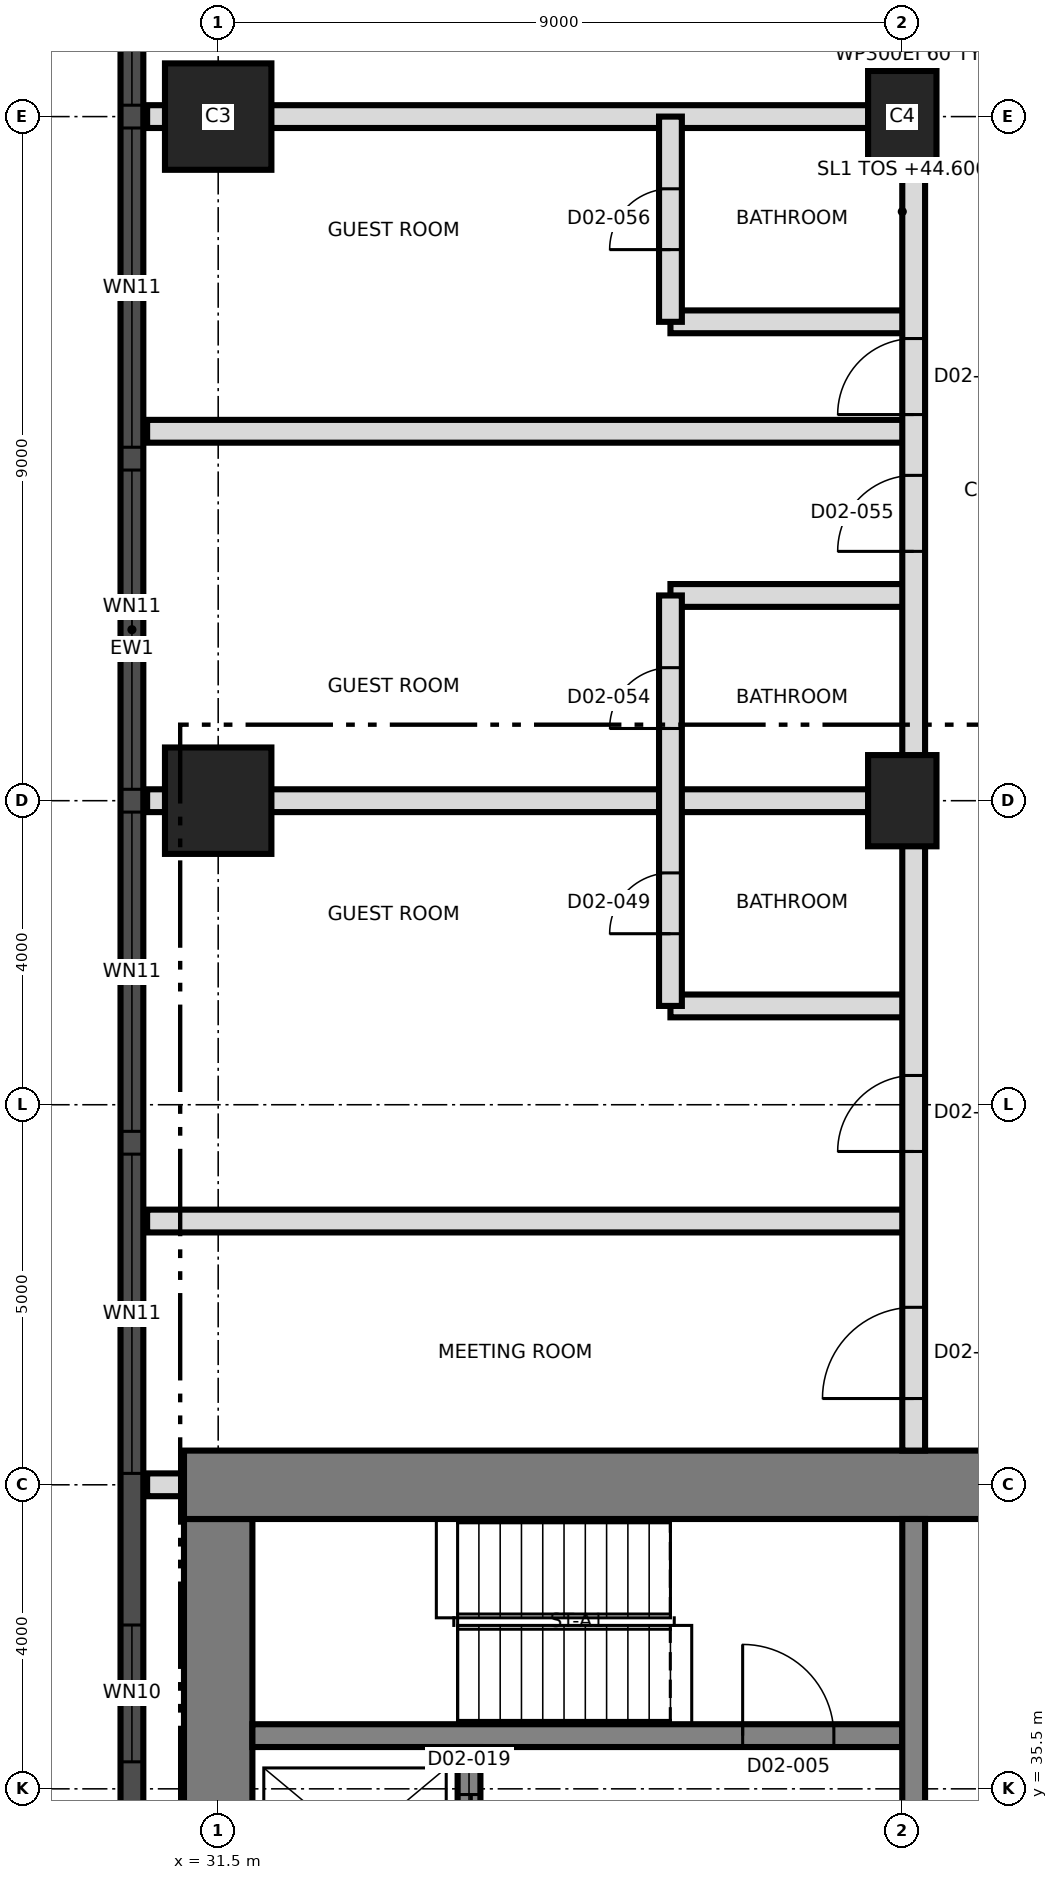
"""IFC4 building model, lengths in metres.
Left out: names, types, materials, properties, quantities, classifications, styles, units other than length and angle.
Written with IfcOpenShell. Run it as: python <this file> out.ifc"""

import sys

from ifc_helpers import new_model, si_unit, direction, frame, frame_2d, origin, origin_2d, place, context, subcontext, project, spatial, rectangle, extrude, element, fill, save


model = new_model("IFC4")
c1 = context("Model", 3, precision=1e-05, world=origin(), true_north=direction((0.0, 1.0)))
c2 = subcontext(c1, "Body", "Model", "MODEL_VIEW")
j1 = project(units=[si_unit("LENGTHUNIT", "METRE"), si_unit("PLANEANGLEUNIT", "RADIAN")], contexts=[c1])
p1 = place(None, origin())
s1 = spatial("IfcSite", under=j1, at=p1, CompositionType="ELEMENT")
p2 = place(p1, origin())
s2 = spatial("IfcBuilding", under=s1, at=p2, CompositionType="ELEMENT")
p3 = place(p2, frame((0.0, 0.0, 44.6)))
s3 = spatial("IfcBuildingStorey", under=s2, at=p3, CompositionType="ELEMENT", Elevation=44.6)
p4 = place(p3, frame((31.5, 21.95, 0.0), z_axis=(0.0, 0.0, 1.0), x_axis=(0.0, 1.0, 0.0)))
e1 = element("IfcWall", 1, at=p4, inside=s3, PredefinedType="SHEAR", context=c2, shape_type="SweptSolid", body=[
    extrude(rectangle(XDim=17.1, YDim=0.9, at=frame_2d((8.55, 0.0))), origin(), (0.0, 0.0, 1.0), 3.7),
])
p5 = place(p3, frame((31.05, 39.5, 0.0), z_axis=(0.0, 0.0, 1.0), x_axis=(1.0, 0.0, 0.0)))
e2 = element("IfcWall", 2, at=p5, inside=s3, PredefinedType="SHEAR", context=c2, shape_type="SweptSolid", body=[
    extrude(rectangle(XDim=27.0, YDim=0.9, at=frame_2d((13.5, 0.0))), origin(), (0.0, 0.0, 1.0), 3.7),
])
p6 = place(p5, frame((10.65, 0.0, 0.0)))
e3 = element("IfcOpeningElement", 3, at=p6, cuts=e2, PredefinedType="OPENING", context=c2, shape_type="SweptSolid", body=[
    extrude(rectangle(XDim=1.2, YDim=2.1, at=frame_2d((0.6, 1.05))), frame((0.0, 0.46, 0.0), z_axis=(0.0, -1.0, 0.0), x_axis=(1.0, 0.0, 0.0)), (0.0, 0.0, 1.0), 0.92),
])
p7 = place(p3, frame((31.95, 36.2, 0.0), z_axis=(0.0, 0.0, 1.0), x_axis=(1.0, 0.0, 0.0)))
e4 = element("IfcWall", 4, at=p7, inside=s3, PredefinedType="SHEAR", context=c2, shape_type="SweptSolid", body=[
    extrude(rectangle(XDim=8.55, YDim=0.3, at=frame_2d((4.275, 0.0))), origin(), (0.0, 0.0, 1.0), 3.7),
])
p8 = place(p7, frame((6.45, 0.0, 0.0)))
e5 = element("IfcOpeningElement", 5, at=p8, cuts=e4, PredefinedType="OPENING", context=c2, shape_type="SweptSolid", body=[
    extrude(rectangle(XDim=1.2, YDim=2.1, at=frame_2d((0.6, 1.05))), frame((0.0, 0.16, 0.0), z_axis=(0.0, -1.0, 0.0), x_axis=(1.0, 0.0, 0.0)), (0.0, 0.0, 1.0), 0.32),
])
p9 = place(p3, frame((40.65, 33.5, 0.0), z_axis=(0.0, 0.0, 1.0), x_axis=(0.0, 1.0, 0.0)))
e6 = element("IfcWall", 6, at=p9, inside=s3, PredefinedType="SHEAR", context=c2, shape_type="SweptSolid", body=[
    extrude(rectangle(XDim=5.55, YDim=0.3, at=frame_2d((2.775, 0.0))), origin(), (0.0, 0.0, 1.0), 3.7),
])
p10 = place(p3, frame((34.8, 33.5, 0.0), z_axis=(0.0, 0.0, 1.0), x_axis=(0.0, 1.0, 0.0)))
e7 = element("IfcWall", 7, at=p10, inside=s3, PredefinedType="SHEAR", context=c2, shape_type="SweptSolid", body=[
    extrude(rectangle(XDim=2.55, YDim=0.3, at=frame_2d((1.275, 0.0))), origin(), (0.0, 0.0, 1.0), 3.7),
])
p11 = place(p10, frame((0.625, 0.0, 0.0)))
e8 = element("IfcOpeningElement", 8, at=p11, cuts=e7, PredefinedType="OPENING", context=c2, shape_type="SweptSolid", body=[
    extrude(rectangle(XDim=1.3, YDim=2.4, at=frame_2d((0.65, 1.2))), frame((0.0, 0.16, 0.0), z_axis=(0.0, -1.0, 0.0), x_axis=(1.0, 0.0, 0.0)), (0.0, 0.0, 1.0), 0.32),
])
p12 = place(p3, frame((31.5, 48.5, 0.0), z_axis=(0.0, 0.0, 1.0), x_axis=(1.0, 0.0, 0.0)))
e9 = element("IfcColumn", 9, at=p12, inside=s3, PredefinedType="COLUMN", context=c2, shape_type="SweptSolid", body=[
    extrude(rectangle(XDim=1.4, YDim=1.4, at=origin_2d()), origin(), (0.0, 0.0, 1.0), 3.7),
])
p13 = place(p3, frame((40.5, 48.5, 0.0), z_axis=(0.0, 0.0, 1.0), x_axis=(0.0, 1.0, 0.0)))
e10 = element("IfcColumn", 10, at=p13, inside=s3, PredefinedType="COLUMN", context=c2, shape_type="SweptSolid", body=[
    extrude(rectangle(XDim=1.2, YDim=0.9, at=origin_2d()), origin(), (0.0, 0.0, 1.0), 3.7),
])
p14 = place(p3, frame((31.5, 57.5, 0.0), z_axis=(0.0, 0.0, 1.0), x_axis=(1.0, 0.0, 0.0)))
e11 = element("IfcColumn", 11, at=p14, inside=s3, PredefinedType="COLUMN", context=c2, shape_type="SweptSolid", body=[
    extrude(rectangle(XDim=1.4, YDim=1.4, at=origin_2d()), origin(), (0.0, 0.0, 1.0), 3.7),
])
p15 = place(p3, frame((40.5, 57.5, 0.0), z_axis=(0.0, 0.0, 1.0), x_axis=(0.0, 1.0, 0.0)))
e12 = element("IfcColumn", 12, at=p15, inside=s3, PredefinedType="COLUMN", context=c2, shape_type="SweptSolid", body=[
    extrude(rectangle(XDim=1.2, YDim=0.9, at=origin_2d()), origin(), (0.0, 0.0, 1.0), 3.7),
])
p16 = place(p3, frame((30.365, 66.992, 0.0), z_axis=(0.0, 0.0, 1.0), x_axis=(0.0, -1.0, 0.0)))
e13 = element("IfcWall", 13, at=p16, inside=s3, PredefinedType="SOLIDWALL", context=c2, shape_type="SweptSolid", body=[
    extrude(rectangle(XDim=32.981, YDim=0.3, at=frame_2d((16.491, 0.0))), origin(), (0.0, 0.0, 1.0), 3.4),
])
p17 = place(p16, frame((1.596, 0.0, 0.3)))
e14 = element("IfcOpeningElement", 14, at=p17, cuts=e13, PredefinedType="OPENING", context=c2, shape_type="SweptSolid", body=[
    extrude(rectangle(XDim=1.8, YDim=2.4, at=frame_2d((0.9, 1.2))), frame((0.0, 0.16, 0.0), z_axis=(0.0, -1.0, 0.0), x_axis=(1.0, 0.0, 0.0)), (0.0, 0.0, 1.0), 0.32),
])
p18 = place(p16, frame((5.142, 0.0, 0.9)))
e15 = element("IfcOpeningElement", 15, at=p18, cuts=e13, PredefinedType="OPENING", context=c2, shape_type="SweptSolid", body=[
    extrude(rectangle(XDim=4.2, YDim=1.5, at=frame_2d((2.1, 0.75))), frame((0.0, 0.16, 0.0), z_axis=(0.0, -1.0, 0.0), x_axis=(1.0, 0.0, 0.0)), (0.0, 0.0, 1.0), 0.32),
])
p19 = place(p16, frame((9.642, 0.0, 0.9)))
e16 = element("IfcOpeningElement", 16, at=p19, cuts=e13, PredefinedType="OPENING", context=c2, shape_type="SweptSolid", body=[
    extrude(rectangle(XDim=4.2, YDim=1.5, at=frame_2d((2.1, 0.75))), frame((0.0, 0.16, 0.0), z_axis=(0.0, -1.0, 0.0), x_axis=(1.0, 0.0, 0.0)), (0.0, 0.0, 1.0), 0.32),
])
p20 = place(p16, frame((14.142, 0.0, 0.9)))
e17 = element("IfcOpeningElement", 17, at=p20, cuts=e13, PredefinedType="OPENING", context=c2, shape_type="SweptSolid", body=[
    extrude(rectangle(XDim=4.2, YDim=1.5, at=frame_2d((2.1, 0.75))), frame((0.0, 0.16, 0.0), z_axis=(0.0, -1.0, 0.0), x_axis=(1.0, 0.0, 0.0)), (0.0, 0.0, 1.0), 0.32),
])
p21 = place(p16, frame((18.642, 0.0, 0.9)))
e18 = element("IfcOpeningElement", 18, at=p21, cuts=e13, PredefinedType="OPENING", context=c2, shape_type="SweptSolid", body=[
    extrude(rectangle(XDim=4.2, YDim=1.5, at=frame_2d((2.1, 0.75))), frame((0.0, 0.16, 0.0), z_axis=(0.0, -1.0, 0.0), x_axis=(1.0, 0.0, 0.0)), (0.0, 0.0, 1.0), 0.32),
])
p22 = place(p16, frame((23.142, 0.0, 0.9)))
e19 = element("IfcOpeningElement", 19, at=p22, cuts=e13, PredefinedType="OPENING", context=c2, shape_type="SweptSolid", body=[
    extrude(rectangle(XDim=4.2, YDim=1.5, at=frame_2d((2.1, 0.75))), frame((0.0, 0.16, 0.0), z_axis=(0.0, -1.0, 0.0), x_axis=(1.0, 0.0, 0.0)), (0.0, 0.0, 1.0), 0.32),
])
p23 = place(p16, frame((29.337, 0.0, 0.3)))
e20 = element("IfcOpeningElement", 20, at=p23, cuts=e13, PredefinedType="OPENING", context=c2, shape_type="SweptSolid", body=[
    extrude(rectangle(XDim=1.8, YDim=2.4, at=frame_2d((0.9, 1.2))), frame((0.0, 0.16, 0.0), z_axis=(0.0, -1.0, 0.0), x_axis=(1.0, 0.0, 0.0)), (0.0, 0.0, 1.0), 0.32),
])
p24 = place(p3, frame((30.565, 39.5, 0.0), z_axis=(0.0, 0.0, 1.0), x_axis=(1.0, 0.0, 0.0)))
e21 = element("IfcWall", 21, at=p24, inside=s3, PredefinedType="PARTITIONING", context=c2, shape_type="SweptSolid", body=[
    extrude(rectangle(XDim=0.465, YDim=0.3, at=frame_2d((0.232, 0.0))), origin(), (0.0, 0.0, 1.0), 3.4),
])
p25 = place(p3, frame((30.565, 42.97, 0.0), z_axis=(0.0, 0.0, 1.0), x_axis=(1.0, 0.0, 0.0)))
e22 = element("IfcWall", 22, at=p25, inside=s3, PredefinedType="PARTITIONING", context=c2, shape_type="SweptSolid", body=[
    extrude(rectangle(XDim=10.085, YDim=0.3, at=frame_2d((5.042, 0.0))), origin(), (0.0, 0.0, 1.0), 3.4),
])
p26 = place(p3, frame((37.45, 45.8, 0.0), z_axis=(0.0, 0.0, 1.0), x_axis=(1.0, 0.0, 0.0)))
e23 = element("IfcWall", 23, at=p26, inside=s3, PredefinedType="PARTITIONING", context=c2, shape_type="SweptSolid", body=[
    extrude(rectangle(XDim=3.2, YDim=0.3, at=frame_2d((1.6, 0.0))), origin(), (0.0, 0.0, 1.0), 3.4),
])
p27 = place(p3, frame((30.565, 48.5, 0.0), z_axis=(0.0, 0.0, 1.0), x_axis=(1.0, 0.0, 0.0)))
e24 = element("IfcWall", 24, at=p27, inside=s3, PredefinedType="PARTITIONING", context=c2, shape_type="SweptSolid", body=[
    extrude(rectangle(XDim=10.085, YDim=0.3, at=frame_2d((5.042, 0.0))), origin(), (0.0, 0.0, 1.0), 3.4),
])
p28 = place(p3, frame((37.45, 51.2, 0.0), z_axis=(0.0, 0.0, 1.0), x_axis=(1.0, 0.0, 0.0)))
e25 = element("IfcWall", 25, at=p28, inside=s3, PredefinedType="PARTITIONING", context=c2, shape_type="SweptSolid", body=[
    extrude(rectangle(XDim=3.2, YDim=0.3, at=frame_2d((1.6, 0.0))), origin(), (0.0, 0.0, 1.0), 3.4),
])
p29 = place(p3, frame((30.565, 53.36, 0.0), z_axis=(0.0, 0.0, 1.0), x_axis=(1.0, 0.0, 0.0)))
e26 = element("IfcWall", 26, at=p29, inside=s3, PredefinedType="PARTITIONING", context=c2, shape_type="SweptSolid", body=[
    extrude(rectangle(XDim=10.085, YDim=0.3, at=frame_2d((5.042, 0.0))), origin(), (0.0, 0.0, 1.0), 3.4),
])
p30 = place(p3, frame((37.45, 54.8, 0.0), z_axis=(0.0, 0.0, 1.0), x_axis=(1.0, 0.0, 0.0)))
e27 = element("IfcWall", 27, at=p30, inside=s3, PredefinedType="PARTITIONING", context=c2, shape_type="SweptSolid", body=[
    extrude(rectangle(XDim=3.2, YDim=0.3, at=frame_2d((1.6, 0.0))), origin(), (0.0, 0.0, 1.0), 3.4),
])
p31 = place(p3, frame((30.565, 57.5, 0.0), z_axis=(0.0, 0.0, 1.0), x_axis=(1.0, 0.0, 0.0)))
e28 = element("IfcWall", 28, at=p31, inside=s3, PredefinedType="PARTITIONING", context=c2, shape_type="SweptSolid", body=[
    extrude(rectangle(XDim=10.085, YDim=0.3, at=frame_2d((5.042, 0.0))), origin(), (0.0, 0.0, 1.0), 3.4),
])
p32 = place(p3, frame((37.45, 45.8, 0.0), z_axis=(0.0, 0.0, 1.0), x_axis=(0.0, 1.0, 0.0)))
e29 = element("IfcWall", 29, at=p32, inside=s3, PredefinedType="PARTITIONING", context=c2, shape_type="SweptSolid", body=[
    extrude(rectangle(XDim=5.4, YDim=0.3, at=frame_2d((2.7, 0.0))), origin(), (0.0, 0.0, 1.0), 3.4),
])
p33 = place(p32, frame((0.95, 0.0, 0.0)))
e30 = element("IfcOpeningElement", 30, at=p33, cuts=e29, PredefinedType="OPENING", context=c2, shape_type="SweptSolid", body=[
    extrude(rectangle(XDim=0.8, YDim=2.1, at=frame_2d((0.4, 1.05))), frame((0.0, 0.16, 0.0), z_axis=(0.0, -1.0, 0.0), x_axis=(1.0, 0.0, 0.0)), (0.0, 0.0, 1.0), 0.32),
])
p34 = place(p32, frame((3.65, 0.0, 0.0)))
e31 = element("IfcOpeningElement", 31, at=p34, cuts=e29, PredefinedType="OPENING", context=c2, shape_type="SweptSolid", body=[
    extrude(rectangle(XDim=0.8, YDim=2.1, at=frame_2d((0.4, 1.05))), frame((0.0, 0.16, 0.0), z_axis=(0.0, -1.0, 0.0), x_axis=(1.0, 0.0, 0.0)), (0.0, 0.0, 1.0), 0.32),
])
p35 = place(p3, frame((37.45, 54.8, 0.0), z_axis=(0.0, 0.0, 1.0), x_axis=(0.0, 1.0, 0.0)))
e32 = element("IfcWall", 32, at=p35, inside=s3, PredefinedType="PARTITIONING", context=c2, shape_type="SweptSolid", body=[
    extrude(rectangle(XDim=2.7, YDim=0.3, at=frame_2d((1.35, 0.0))), origin(), (0.0, 0.0, 1.0), 3.4),
])
p36 = place(p35, frame((0.95, 0.0, 0.0)))
e33 = element("IfcOpeningElement", 33, at=p36, cuts=e32, PredefinedType="OPENING", context=c2, shape_type="SweptSolid", body=[
    extrude(rectangle(XDim=0.8, YDim=2.1, at=frame_2d((0.4, 1.05))), frame((0.0, 0.16, 0.0), z_axis=(0.0, -1.0, 0.0), x_axis=(1.0, 0.0, 0.0)), (0.0, 0.0, 1.0), 0.32),
])
p37 = place(p3, frame((40.65, 39.95, 0.0), z_axis=(0.0, 0.0, 1.0), x_axis=(0.0, 1.0, 0.0)))
e34 = element("IfcWall", 34, at=p37, inside=s3, PredefinedType="PARTITIONING", context=c2, shape_type="SweptSolid", body=[
    extrude(rectangle(XDim=36.725, YDim=0.3, at=frame_2d((18.363, 0.0))), origin(), (0.0, 0.0, 1.0), 3.4),
])
p38 = place(p37, frame((0.685, 0.0, 0.0)))
e35 = element("IfcOpeningElement", 35, at=p38, cuts=e34, PredefinedType="OPENING", context=c2, shape_type="SweptSolid", body=[
    extrude(rectangle(XDim=1.2, YDim=2.1, at=frame_2d((0.6, 1.05))), frame((0.0, 0.16, 0.0), z_axis=(0.0, -1.0, 0.0), x_axis=(1.0, 0.0, 0.0)), (0.0, 0.0, 1.0), 0.32),
])
p39 = place(p37, frame((3.935, 0.0, 0.0)))
e36 = element("IfcOpeningElement", 36, at=p39, cuts=e34, PredefinedType="OPENING", context=c2, shape_type="SweptSolid", body=[
    extrude(rectangle(XDim=1.0, YDim=2.1, at=frame_2d((0.5, 1.05))), frame((0.0, 0.16, 0.0), z_axis=(0.0, -1.0, 0.0), x_axis=(1.0, 0.0, 0.0)), (0.0, 0.0, 1.0), 0.32),
])
p40 = place(p37, frame((11.83, 0.0, 0.0)))
e37 = element("IfcOpeningElement", 37, at=p40, cuts=e34, PredefinedType="OPENING", context=c2, shape_type="SweptSolid", body=[
    extrude(rectangle(XDim=1.0, YDim=2.1, at=frame_2d((0.5, 1.05))), frame((0.0, 0.16, 0.0), z_axis=(0.0, -1.0, 0.0), x_axis=(1.0, 0.0, 0.0)), (0.0, 0.0, 1.0), 0.32),
])
p41 = place(p37, frame((13.63, 0.0, 0.0)))
e38 = element("IfcOpeningElement", 38, at=p41, cuts=e34, PredefinedType="OPENING", context=c2, shape_type="SweptSolid", body=[
    extrude(rectangle(XDim=1.0, YDim=2.1, at=frame_2d((0.5, 1.05))), frame((0.0, 0.16, 0.0), z_axis=(0.0, -1.0, 0.0), x_axis=(1.0, 0.0, 0.0)), (0.0, 0.0, 1.0), 0.32),
])
p42 = place(p37, frame((21.05, 0.0, 0.0)))
e39 = element("IfcOpeningElement", 39, at=p42, cuts=e34, PredefinedType="OPENING", context=c2, shape_type="SweptSolid", body=[
    extrude(rectangle(XDim=1.0, YDim=2.4, at=frame_2d((0.5, 1.2))), frame((0.0, 0.16, 0.0), z_axis=(0.0, -1.0, 0.0), x_axis=(1.0, 0.0, 0.0)), (0.0, 0.0, 1.0), 0.32),
])
p43 = place(p18, origin())
e40 = element("IfcWindow", 40, at=p43, inside=s3, PartitioningType="SINGLE_PANEL", PredefinedType="WINDOW", context=c2, shape_type="SweptSolid", body=[
    extrude(rectangle(XDim=4.2, YDim=1.5, at=frame_2d((2.1, 0.75))), frame((0.0, 0.03, 0.0), z_axis=(0.0, -1.0, 0.0), x_axis=(1.0, 0.0, 0.0)), (0.0, 0.0, 1.0), 0.06),
])
fill(e15, e40)
p44 = place(p19, origin())
e41 = element("IfcWindow", 41, at=p44, inside=s3, PartitioningType="SINGLE_PANEL", PredefinedType="WINDOW", context=c2, shape_type="SweptSolid", body=[
    extrude(rectangle(XDim=4.2, YDim=1.5, at=frame_2d((2.1, 0.75))), frame((0.0, 0.03, 0.0), z_axis=(0.0, -1.0, 0.0), x_axis=(1.0, 0.0, 0.0)), (0.0, 0.0, 1.0), 0.06),
])
fill(e16, e41)
p45 = place(p20, origin())
e42 = element("IfcWindow", 42, at=p45, inside=s3, PartitioningType="SINGLE_PANEL", PredefinedType="WINDOW", context=c2, shape_type="SweptSolid", body=[
    extrude(rectangle(XDim=4.2, YDim=1.5, at=frame_2d((2.1, 0.75))), frame((0.0, 0.03, 0.0), z_axis=(0.0, -1.0, 0.0), x_axis=(1.0, 0.0, 0.0)), (0.0, 0.0, 1.0), 0.06),
])
fill(e17, e42)
p46 = place(p21, origin())
e43 = element("IfcWindow", 43, at=p46, inside=s3, PartitioningType="SINGLE_PANEL", PredefinedType="WINDOW", context=c2, shape_type="SweptSolid", body=[
    extrude(rectangle(XDim=4.2, YDim=1.5, at=frame_2d((2.1, 0.75))), frame((0.0, 0.03, 0.0), z_axis=(0.0, -1.0, 0.0), x_axis=(1.0, 0.0, 0.0)), (0.0, 0.0, 1.0), 0.06),
])
fill(e18, e43)
p47 = place(p22, origin())
e44 = element("IfcWindow", 44, at=p47, inside=s3, PartitioningType="SINGLE_PANEL", PredefinedType="WINDOW", context=c2, shape_type="SweptSolid", body=[
    extrude(rectangle(XDim=4.2, YDim=1.5, at=frame_2d((2.1, 0.75))), frame((0.0, 0.03, 0.0), z_axis=(0.0, -1.0, 0.0), x_axis=(1.0, 0.0, 0.0)), (0.0, 0.0, 1.0), 0.06),
])
fill(e19, e44)
p48 = place(p23, origin())
e45 = element("IfcWindow", 45, at=p48, inside=s3, PartitioningType="SINGLE_PANEL", PredefinedType="WINDOW", context=c2, shape_type="SweptSolid", body=[
    extrude(rectangle(XDim=1.8, YDim=2.4, at=frame_2d((0.9, 1.2))), frame((0.0, 0.03, 0.0), z_axis=(0.0, -1.0, 0.0), x_axis=(1.0, 0.0, 0.0)), (0.0, 0.0, 1.0), 0.06),
])
fill(e20, e45)
p49 = place(p8, origin())
e46 = element("IfcDoor", 46, at=p49, inside=s3, OperationType="SINGLE_SWING_RIGHT", PredefinedType="DOOR", context=c2, shape_type="SweptSolid", body=[
    extrude(rectangle(XDim=1.2, YDim=2.1, at=frame_2d((0.6, 1.05))), frame((0.0, 0.025, 0.0), z_axis=(0.0, -1.0, 0.0), x_axis=(1.0, 0.0, 0.0)), (0.0, 0.0, 1.0), 0.05),
])
fill(e5, e46)
p50 = place(p11, origin())
e47 = element("IfcDoor", 47, at=p50, inside=s3, OperationType="SLIDING_TO_LEFT", PredefinedType="DOOR", context=c2, shape_type="SweptSolid", body=[
    extrude(rectangle(XDim=1.3, YDim=2.4, at=frame_2d((0.65, 1.2))), frame((0.0, 0.025, 0.0), z_axis=(0.0, -1.0, 0.0), x_axis=(1.0, 0.0, 0.0)), (0.0, 0.0, 1.0), 0.05),
])
fill(e8, e47)
p51 = place(p38, origin())
e48 = element("IfcDoor", 48, at=p51, inside=s3, OperationType="SINGLE_SWING_LEFT", PredefinedType="DOOR", context=c2, shape_type="SweptSolid", body=[
    extrude(rectangle(XDim=1.2, YDim=2.1, at=frame_2d((0.6, 1.05))), frame((0.0, 0.025, 0.0), z_axis=(0.0, -1.0, 0.0), x_axis=(1.0, 0.0, 0.0)), (0.0, 0.0, 1.0), 0.05),
])
fill(e35, e48)
p52 = place(p33, origin())
e49 = element("IfcDoor", 49, at=p52, inside=s3, OperationType="SINGLE_SWING_LEFT", PredefinedType="DOOR", context=c2, shape_type="SweptSolid", body=[
    extrude(rectangle(XDim=0.8, YDim=2.1, at=frame_2d((0.4, 1.05))), frame((0.0, 0.025, 0.0), z_axis=(0.0, -1.0, 0.0), x_axis=(1.0, 0.0, 0.0)), (0.0, 0.0, 1.0), 0.05),
])
fill(e30, e49)
p53 = place(p39, origin())
e50 = element("IfcDoor", 50, at=p53, inside=s3, OperationType="SINGLE_SWING_RIGHT", PredefinedType="DOOR", context=c2, shape_type="SweptSolid", body=[
    extrude(rectangle(XDim=1.0, YDim=2.1, at=frame_2d((0.5, 1.05))), frame((0.0, 0.025, 0.0), z_axis=(0.0, -1.0, 0.0), x_axis=(1.0, 0.0, 0.0)), (0.0, 0.0, 1.0), 0.05),
])
fill(e36, e50)
p54 = place(p34, origin())
e51 = element("IfcDoor", 51, at=p54, inside=s3, OperationType="SINGLE_SWING_RIGHT", PredefinedType="DOOR", context=c2, shape_type="SweptSolid", body=[
    extrude(rectangle(XDim=0.8, YDim=2.1, at=frame_2d((0.4, 1.05))), frame((0.0, 0.025, 0.0), z_axis=(0.0, -1.0, 0.0), x_axis=(1.0, 0.0, 0.0)), (0.0, 0.0, 1.0), 0.05),
])
fill(e31, e51)
p55 = place(p40, origin())
e52 = element("IfcDoor", 52, at=p55, inside=s3, OperationType="SINGLE_SWING_LEFT", PredefinedType="DOOR", context=c2, shape_type="SweptSolid", body=[
    extrude(rectangle(XDim=1.0, YDim=2.1, at=frame_2d((0.5, 1.05))), frame((0.0, 0.025, 0.0), z_axis=(0.0, -1.0, 0.0), x_axis=(1.0, 0.0, 0.0)), (0.0, 0.0, 1.0), 0.05),
])
fill(e37, e52)
p56 = place(p36, origin())
e53 = element("IfcDoor", 53, at=p56, inside=s3, OperationType="SINGLE_SWING_LEFT", PredefinedType="DOOR", context=c2, shape_type="SweptSolid", body=[
    extrude(rectangle(XDim=0.8, YDim=2.1, at=frame_2d((0.4, 1.05))), frame((0.0, 0.025, 0.0), z_axis=(0.0, -1.0, 0.0), x_axis=(1.0, 0.0, 0.0)), (0.0, 0.0, 1.0), 0.05),
])
fill(e33, e53)
p57 = place(p41, origin())
e54 = element("IfcDoor", 54, at=p57, inside=s3, OperationType="SINGLE_SWING_LEFT", PredefinedType="DOOR", context=c2, shape_type="SweptSolid", body=[
    extrude(rectangle(XDim=1.0, YDim=2.1, at=frame_2d((0.5, 1.05))), frame((0.0, 0.025, 0.0), z_axis=(0.0, -1.0, 0.0), x_axis=(1.0, 0.0, 0.0)), (0.0, 0.0, 1.0), 0.05),
])
fill(e38, e54)
save(model, sys.argv[1])
